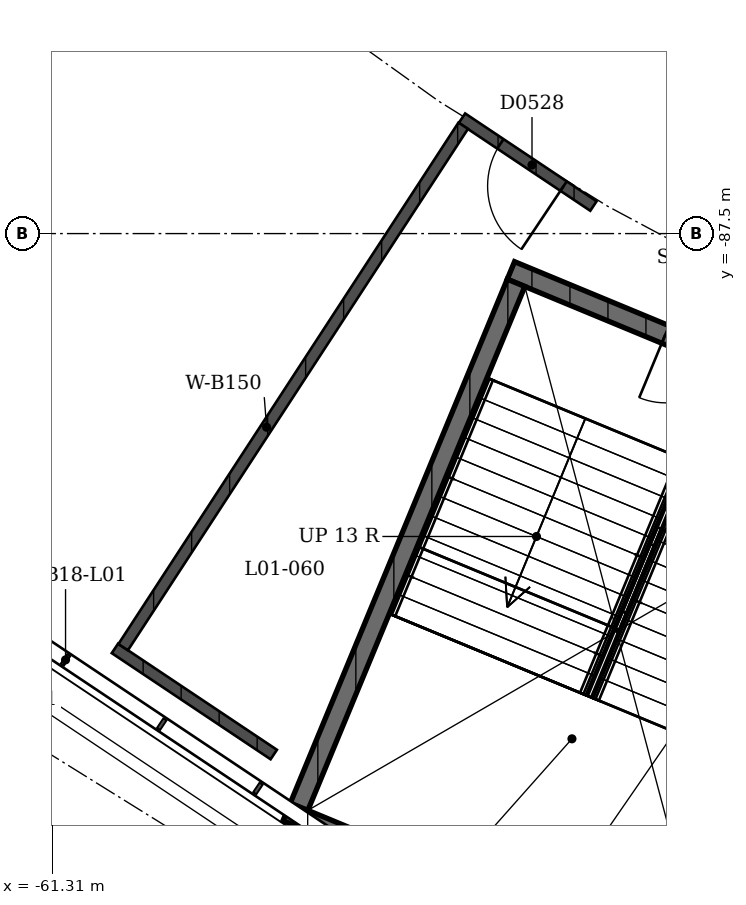
"""IFC4 building model, lengths in metres.
Left out: names, types, materials, properties, quantities, classifications, styles, units other than length and angle.
Written with IfcOpenShell. Run it as: python <this file> out.ifc"""

import sys

from ifc_helpers import new_model, si_unit, direction, frame, frame_2d, origin, place, context, subcontext, project, spatial, rectangle, extrude, element, fill, save


model = new_model("IFC4")
c1 = context("Model", 3, precision=1e-05, world=origin(), true_north=direction((0.0, 1.0)))
c2 = subcontext(c1, "Body", "Model", "MODEL_VIEW")
j1 = project(units=[si_unit("LENGTHUNIT", "METRE"), si_unit("PLANEANGLEUNIT", "RADIAN")], contexts=[c1])
p1 = place(None, origin())
s1 = spatial("IfcSite", under=j1, at=p1, CompositionType="ELEMENT")
p2 = place(p1, origin())
s2 = spatial("IfcBuilding", under=s1, at=p2, CompositionType="ELEMENT")
p3 = place(p2, frame((0.0, 0.0, 4.5)))
s3 = spatial("IfcBuildingStorey", under=s2, at=p3, CompositionType="ELEMENT", Elevation=4.5)
p4 = place(p3, frame((-55.274, -87.985, 0.0), z_axis=(0.0, 0.0, 1.0), x_axis=(0.923877480578, -0.382688386133, 0.0)))
e1 = element("IfcWall", 1, at=p4, inside=s3, PredefinedType="SHEAR", context=c2, shape_type="SweptSolid", body=[
    extrude(rectangle(XDim=12.15, YDim=0.25, at=frame_2d((6.075, 0.0))), origin(), (0.0, 0.0, 1.0), 4.09),
])
p5 = place(p4, frame((2.2, 0.0, 0.0)))
e2 = element("IfcOpeningElement", 2, at=p5, cuts=e1, PredefinedType="OPENING", context=c2, shape_type="SweptSolid", body=[
    extrude(rectangle(XDim=1.8, YDim=2.1, at=frame_2d((0.9, 1.05))), frame((0.0, 0.125, 0.0), z_axis=(0.0, -1.0, 0.0), x_axis=(1.0, 0.0, 0.0)), (0.0, 0.0, 1.0), 0.25),
])
p6 = place(p4, frame((8.15, 0.0, 0.0)))
e3 = element("IfcOpeningElement", 3, at=p6, cuts=e1, PredefinedType="OPENING", context=c2, shape_type="SweptSolid", body=[
    extrude(rectangle(XDim=1.8, YDim=2.1, at=frame_2d((0.9, 1.05))), frame((0.0, 0.125, 0.0), z_axis=(0.0, -1.0, 0.0), x_axis=(1.0, 0.0, 0.0)), (0.0, 0.0, 1.0), 0.25),
])
p7 = place(p3, frame((-58.224, -95.108, 0.0), z_axis=(0.0, 0.0, 1.0), x_axis=(0.923884584817, -0.382671234792, 0.0)))
e4 = element("IfcWall", 4, at=p7, inside=s3, PredefinedType="SHEAR", context=c2, shape_type="SweptSolid", body=[
    extrude(rectangle(XDim=12.15, YDim=0.25, at=frame_2d((6.075, 0.0))), origin(), (0.0, 0.0, 1.0), 4.09),
])
p8 = place(p3, frame((-55.206, -88.148, 0.0), z_axis=(0.0, 0.0, 1.0), x_axis=(-0.382664910245, -0.923887204407, 0.0)))
e5 = element("IfcWall", 5, at=p8, inside=s3, PredefinedType="SHEAR", context=c2, shape_type="SweptSolid", body=[
    extrude(rectangle(XDim=7.46, YDim=0.25, at=frame_2d((3.73, 0.0))), origin(), (0.0, 0.0, 1.0), 4.09),
])
p9 = place(p3, frame((-54.188, -87.138, 0.0), z_axis=(0.0, 0.0, 1.0), x_axis=(-0.831435859109, 0.555620744921, 0.0)))
e6 = element("IfcWall", 6, at=p9, inside=s3, PredefinedType="SOLIDWALL", context=c2, shape_type="SweptSolid", body=[
    extrude(rectangle(XDim=2.08, YDim=0.15, at=frame_2d((1.04, 0.0))), origin(), (0.0, 0.0, 1.0), 3.0),
])
p10 = place(p9, frame((0.472, 0.0, 0.0)))
e7 = element("IfcOpeningElement", 7, at=p10, cuts=e6, PredefinedType="OPENING", context=c2, shape_type="SweptSolid", body=[
    extrude(rectangle(XDim=1.0, YDim=2.1, at=frame_2d((0.5, 1.05))), frame((0.0, 0.075, 0.0), z_axis=(0.0, -1.0, 0.0), x_axis=(1.0, 0.0, 0.0)), (0.0, 0.0, 1.0), 0.15),
])
p11 = place(p3, frame((-58.394, -94.354, 0.0), z_axis=(0.0, 0.0, 1.0), x_axis=(-0.83145207432, 0.555596479569, 0.0)))
e8 = element("IfcWall", 8, at=p11, inside=s3, PredefinedType="SOLIDWALL", context=c2, shape_type="SweptSolid", body=[
    extrude(rectangle(XDim=2.513, YDim=0.15, at=frame_2d((1.257, 0.0))), origin(), (0.0, 0.0, 1.0), 3.0),
])
p12 = place(p3, frame((-55.902, -86.081, 0.0), z_axis=(0.0, 0.0, 1.0), x_axis=(-0.546272327191, -0.837607631618, 0.0)))
e9 = element("IfcWall", 9, at=p12, inside=s3, PredefinedType="SOLIDWALL", context=c2, shape_type="SweptSolid", body=[
    extrude(rectangle(XDim=8.19, YDim=0.15, at=frame_2d((4.095, 0.0))), origin(), (0.0, 0.0, 1.0), 3.0),
])
p13 = place(p5, origin())
e10 = element("IfcDoor", 10, at=p13, inside=s3, OperationType="DOUBLE_DOOR_SINGLE_SWING", PredefinedType="DOOR", context=c2, shape_type="SweptSolid", body=[
    extrude(rectangle(XDim=1.8, YDim=2.1, at=frame_2d((0.9, 1.05))), frame((0.0, 0.025, 0.0), z_axis=(0.0, -1.0, 0.0), x_axis=(1.0, 0.0, 0.0)), (0.0, 0.0, 1.0), 0.05),
])
fill(e2, e10)
p14 = place(p10, origin())
e11 = element("IfcDoor", 11, at=p14, inside=s3, OperationType="SINGLE_SWING_RIGHT", PredefinedType="DOOR", context=c2, shape_type="SweptSolid", body=[
    extrude(rectangle(XDim=1.0, YDim=2.1, at=frame_2d((0.5, 1.05))), frame((0.0, 0.025, 0.0), z_axis=(0.0, -1.0, 0.0), x_axis=(1.0, 0.0, 0.0)), (0.0, 0.0, 1.0), 0.05),
])
fill(e7, e11)
save(model, sys.argv[1])
